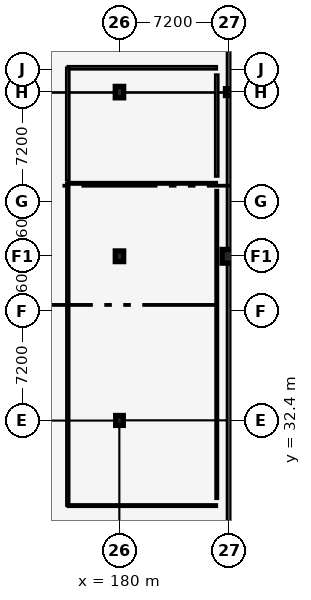
"""IFC4 building model, lengths in metres.
Left out: names, types, materials, properties, quantities, classifications, styles, units other than length and angle.
Written with IfcOpenShell. Run it as: python <this file> out.ifc"""

import sys

from ifc_helpers import new_model, si_unit, direction, frame, frame_2d, origin, origin_2d, place, context, subcontext, project, spatial, rectangle, circle, extrude, element, fill, save


model = new_model("IFC4")
c1 = context("Model", 3, precision=1e-05, world=origin(), true_north=direction((0.0, 1.0)))
c2 = subcontext(c1, "Body", "Model", "MODEL_VIEW")
j1 = project(units=[si_unit("LENGTHUNIT", "METRE"), si_unit("PLANEANGLEUNIT", "RADIAN")], contexts=[c1])
p1 = place(None, origin())
s1 = spatial("IfcSite", under=j1, at=p1, CompositionType="ELEMENT")
p2 = place(p1, origin())
s2 = spatial("IfcBuilding", under=s1, at=p2, CompositionType="ELEMENT")
p3 = place(p2, frame((0.0, 0.0, 13.2)))
s3 = spatial("IfcBuildingStorey", under=s2, at=p3, CompositionType="ELEMENT", Elevation=13.2)
p4 = place(p3, frame((180.0, 32.4, 0.0), z_axis=(0.0, 0.0, 1.0), x_axis=(1.0, 0.0, 0.0)))
e1 = element("IfcColumn", 1, at=p4, inside=s3, PredefinedType="COLUMN", context=c2, shape_type="SweptSolid", body=[
    extrude(rectangle(XDim=0.5, YDim=0.65, at=origin_2d()), origin(), (0.0, 0.0, 1.0), 4.2),
])
p5 = place(p3, frame((180.0, 43.2, 0.0), z_axis=(0.0, 0.0, 1.0), x_axis=(1.0, 0.0, 0.0)))
e2 = element("IfcColumn", 2, at=p5, inside=s3, PredefinedType="COLUMN", context=c2, shape_type="SweptSolid", body=[
    extrude(rectangle(XDim=0.55, YDim=0.7, at=origin_2d()), origin(), (0.0, 0.0, 1.0), 4.2),
])
p6 = place(p3, frame((180.0, 54.0, 0.0), z_axis=(0.0, 0.0, 1.0), x_axis=(1.0, 0.0, 0.0)))
e3 = element("IfcColumn", 3, at=p6, inside=s3, PredefinedType="COLUMN", context=c2, shape_type="SweptSolid", body=[
    extrude(rectangle(XDim=0.55, YDim=0.75, at=origin_2d()), origin(), (0.0, 0.0, 1.0), 4.2),
])
p7 = place(p3, frame((187.2, 43.2, 0.0), z_axis=(0.0, 0.0, 1.0), x_axis=(1.0, 0.0, 0.0)))
e4 = element("IfcColumn", 4, at=p7, inside=s3, PredefinedType="COLUMN", context=c2, shape_type="SweptSolid", body=[
    extrude(circle(Radius=0.45, at=origin_2d()), origin(), (0.0, 0.0, 1.0), 4.2),
])
p8 = place(p3, frame((187.2, 54.0, 0.0), z_axis=(0.0, 0.0, 1.0), x_axis=(1.0, 0.0, 0.0)))
e5 = element("IfcColumn", 5, at=p8, inside=s3, PredefinedType="COLUMN", context=c2, shape_type="SweptSolid", body=[
    extrude(rectangle(XDim=0.45, YDim=0.45, at=origin_2d()), origin(), (0.0, 0.0, 1.0), 4.2),
])
p9 = place(p3, frame((187.2, 10.8, 0.0), z_axis=(0.0, 0.0, 1.0), x_axis=(0.0, 1.0, 0.0)))
e6 = element("IfcWall", 6, at=p9, inside=s3, PredefinedType="SOLIDWALL", context=c2, shape_type="SweptSolid", body=[
    extrude(rectangle(XDim=54.0, YDim=0.25, at=frame_2d((27.0, 0.0))), origin(), (0.0, 0.0, 1.0), 3.35),
])
p10 = place(p9, frame((2.2, 0.0, 0.78)))
e7 = element("IfcOpeningElement", 7, at=p10, cuts=e6, PredefinedType="OPENING", context=c2, shape_type="SweptSolid", body=[
    extrude(rectangle(XDim=1.5, YDim=1.75, at=frame_2d((0.75, 0.875))), frame((0.0, 0.135, 0.0), z_axis=(0.0, -1.0, 0.0), x_axis=(1.0, 0.0, 0.0)), (0.0, 0.0, 1.0), 0.27),
])
p11 = place(p9, frame((9.4, 0.0, 0.78)))
e8 = element("IfcOpeningElement", 8, at=p11, cuts=e6, PredefinedType="OPENING", context=c2, shape_type="SweptSolid", body=[
    extrude(rectangle(XDim=1.65, YDim=1.8, at=frame_2d((0.825, 0.9))), frame((0.0, 0.135, 0.0), z_axis=(0.0, -1.0, 0.0), x_axis=(1.0, 0.0, 0.0)), (0.0, 0.0, 1.0), 0.27),
])
p12 = place(p9, frame((16.6, 0.0, 0.78)))
e9 = element("IfcOpeningElement", 9, at=p12, cuts=e6, PredefinedType="OPENING", context=c2, shape_type="SweptSolid", body=[
    extrude(rectangle(XDim=1.95, YDim=1.8, at=frame_2d((0.975, 0.9))), frame((0.0, 0.135, 0.0), z_axis=(0.0, -1.0, 0.0), x_axis=(1.0, 0.0, 0.0)), (0.0, 0.0, 1.0), 0.27),
])
p13 = place(p9, frame((23.8, 0.0, 0.78)))
e10 = element("IfcOpeningElement", 10, at=p13, cuts=e6, PredefinedType="OPENING", context=c2, shape_type="SweptSolid", body=[
    extrude(rectangle(XDim=2.1, YDim=1.8, at=frame_2d((1.05, 0.9))), frame((0.0, 0.135, 0.0), z_axis=(0.0, -1.0, 0.0), x_axis=(1.0, 0.0, 0.0)), (0.0, 0.0, 1.0), 0.27),
])
p14 = place(p9, frame((38.2, 0.0, 0.78)))
e11 = element("IfcOpeningElement", 11, at=p14, cuts=e6, PredefinedType="OPENING", context=c2, shape_type="SweptSolid", body=[
    extrude(rectangle(XDim=1.25, YDim=1.7, at=frame_2d((0.625, 0.85))), frame((0.0, 0.135, 0.0), z_axis=(0.0, -1.0, 0.0), x_axis=(1.0, 0.0, 0.0)), (0.0, 0.0, 1.0), 0.27),
])
p15 = place(p3, frame((176.6, 48.0, 0.0), z_axis=(0.0, 0.0, 1.0), x_axis=(1.0, 0.0, 0.0)))
e12 = element("IfcWall", 12, at=p15, inside=s3, PredefinedType="PARTITIONING", context=c2, shape_type="SweptSolid", body=[
    extrude(rectangle(XDim=9.8, YDim=0.15, at=frame_2d((4.9, 0.0))), origin(), (0.0, 0.0, 1.0), 3.6),
])
p16 = place(p3, frame((186.4, 26.8, 0.0), z_axis=(0.0, 0.0, 1.0), x_axis=(-1.0, 0.0, 0.0)))
e13 = element("IfcWall", 13, at=p16, inside=s3, PredefinedType="PARTITIONING", context=c2, shape_type="SweptSolid", body=[
    extrude(rectangle(XDim=9.8, YDim=0.15, at=frame_2d((4.9, 0.0))), origin(), (0.0, 0.0, 1.0), 3.38),
])
p17 = place(p3, frame((186.4, 27.25, 0.0), z_axis=(0.0, 0.0, 1.0), x_axis=(0.0, 1.0, 0.0)))
e14 = element("IfcWall", 14, at=p17, inside=s3, PredefinedType="PARTITIONING", context=c2, shape_type="SweptSolid", body=[
    extrude(rectangle(XDim=20.3, YDim=0.15, at=frame_2d((10.15, 0.0))), origin(), (0.0, 0.0, 1.0), 3.175),
])
p18 = place(p3, frame((176.6, 48.0, 0.0), z_axis=(0.0, 0.0, 1.0), x_axis=(0.0, -1.0, 0.0)))
e15 = element("IfcWall", 15, at=p18, inside=s3, PredefinedType="SOLIDWALL", context=c2, shape_type="SweptSolid", body=[
    extrude(rectangle(XDim=21.2, YDim=0.18, at=frame_2d((10.6, 0.0))), origin(), (0.0, 0.0, 1.0), 3.175),
])
p19 = place(p18, frame((10.1, 0.0, 0.0)))
e16 = element("IfcOpeningElement", 16, at=p19, cuts=e15, PredefinedType="OPENING", context=c2, shape_type="SweptSolid", body=[
    extrude(rectangle(XDim=1.0, YDim=2.15, at=frame_2d((0.5, 1.075))), frame((0.0, 0.1, 0.0), z_axis=(0.0, -1.0, 0.0), x_axis=(1.0, 0.0, 0.0)), (0.0, 0.0, 1.0), 0.2),
])
p20 = place(p3, frame((176.6, 55.6, 0.0), z_axis=(0.0, 0.0, 1.0), x_axis=(1.0, 0.0, 0.0)))
e17 = element("IfcWall", 17, at=p20, inside=s3, PredefinedType="SOLIDWALL", context=c2, shape_type="SweptSolid", body=[
    extrude(rectangle(XDim=9.8, YDim=0.2, at=frame_2d((4.9, 0.0))), origin(), (0.0, 0.0, 1.0), 3.6),
])
p21 = place(p3, frame((186.4, 48.45, 0.0), z_axis=(0.0, 0.0, 1.0), x_axis=(0.0, 1.0, 0.0)))
e18 = element("IfcWall", 18, at=p21, inside=s3, PredefinedType="SOLIDWALL", context=c2, shape_type="SweptSolid", body=[
    extrude(rectangle(XDim=6.7, YDim=0.2, at=frame_2d((3.35, 0.0))), origin(), (0.0, 0.0, 1.0), 3.482),
])
p22 = place(p3, frame((176.6, 55.6, 0.0), z_axis=(0.0, 0.0, 1.0), x_axis=(0.0, -1.0, 0.0)))
e19 = element("IfcWall", 19, at=p22, inside=s3, PredefinedType="SOLIDWALL", context=c2, shape_type="SweptSolid", body=[
    extrude(rectangle(XDim=7.4, YDim=0.2, at=frame_2d((3.7, 0.0))), origin(), (0.0, 0.0, 1.0), 3.482),
])
p23 = place(p22, frame((2.8, 0.0, 0.0)))
e20 = element("IfcOpeningElement", 20, at=p23, cuts=e19, PredefinedType="OPENING", context=c2, shape_type="SweptSolid", body=[
    extrude(rectangle(XDim=1.8, YDim=2.2, at=frame_2d((0.9, 1.1))), frame((0.0, 0.11, 0.0), z_axis=(0.0, -1.0, 0.0), x_axis=(1.0, 0.0, 0.0)), (0.0, 0.0, 1.0), 0.22),
])
p24 = place(p12, origin())
e21 = element("IfcWindow", 21, at=p24, inside=s3, PartitioningType="SINGLE_PANEL", PredefinedType="WINDOW", context=c2, shape_type="SweptSolid", body=[
    extrude(rectangle(XDim=1.95, YDim=1.8, at=frame_2d((0.975, 0.9))), frame((0.0, 0.03, 0.0), z_axis=(0.0, -1.0, 0.0), x_axis=(1.0, 0.0, 0.0)), (0.0, 0.0, 1.0), 0.06),
])
fill(e9, e21)
p25 = place(p13, origin())
e22 = element("IfcWindow", 22, at=p25, inside=s3, PartitioningType="SINGLE_PANEL", PredefinedType="WINDOW", context=c2, shape_type="SweptSolid", body=[
    extrude(rectangle(XDim=2.1, YDim=1.8, at=frame_2d((1.05, 0.9))), frame((0.0, 0.03, 0.0), z_axis=(0.0, -1.0, 0.0), x_axis=(1.0, 0.0, 0.0)), (0.0, 0.0, 1.0), 0.06),
])
fill(e10, e22)
p26 = place(p14, origin())
e23 = element("IfcWindow", 23, at=p26, inside=s3, PartitioningType="SINGLE_PANEL", PredefinedType="WINDOW", context=c2, shape_type="SweptSolid", body=[
    extrude(rectangle(XDim=1.25, YDim=1.7, at=frame_2d((0.625, 0.85))), frame((0.0, 0.03, 0.0), z_axis=(0.0, -1.0, 0.0), x_axis=(1.0, 0.0, 0.0)), (0.0, 0.0, 1.0), 0.06),
])
fill(e11, e23)
p27 = place(p19, origin())
e24 = element("IfcDoor", 24, at=p27, inside=s3, OperationType="SINGLE_SWING_LEFT", PredefinedType="DOOR", context=c2, shape_type="SweptSolid", body=[
    extrude(rectangle(XDim=1.0, YDim=2.15, at=frame_2d((0.5, 1.075))), frame((0.0, 0.025, 0.0), z_axis=(0.0, -1.0, 0.0), x_axis=(1.0, 0.0, 0.0)), (0.0, 0.0, 1.0), 0.05),
])
fill(e16, e24)
p28 = place(p23, origin())
e25 = element("IfcDoor", 25, at=p28, inside=s3, OperationType="DOUBLE_SWING_LEFT", PredefinedType="DOOR", context=c2, shape_type="SweptSolid", body=[
    extrude(rectangle(XDim=1.8, YDim=2.2, at=frame_2d((0.9, 1.1))), frame((0.0, 0.025, 0.0), z_axis=(0.0, -1.0, 0.0), x_axis=(1.0, 0.0, 0.0)), (0.0, 0.0, 1.0), 0.05),
])
fill(e20, e25)
save(model, sys.argv[1])
